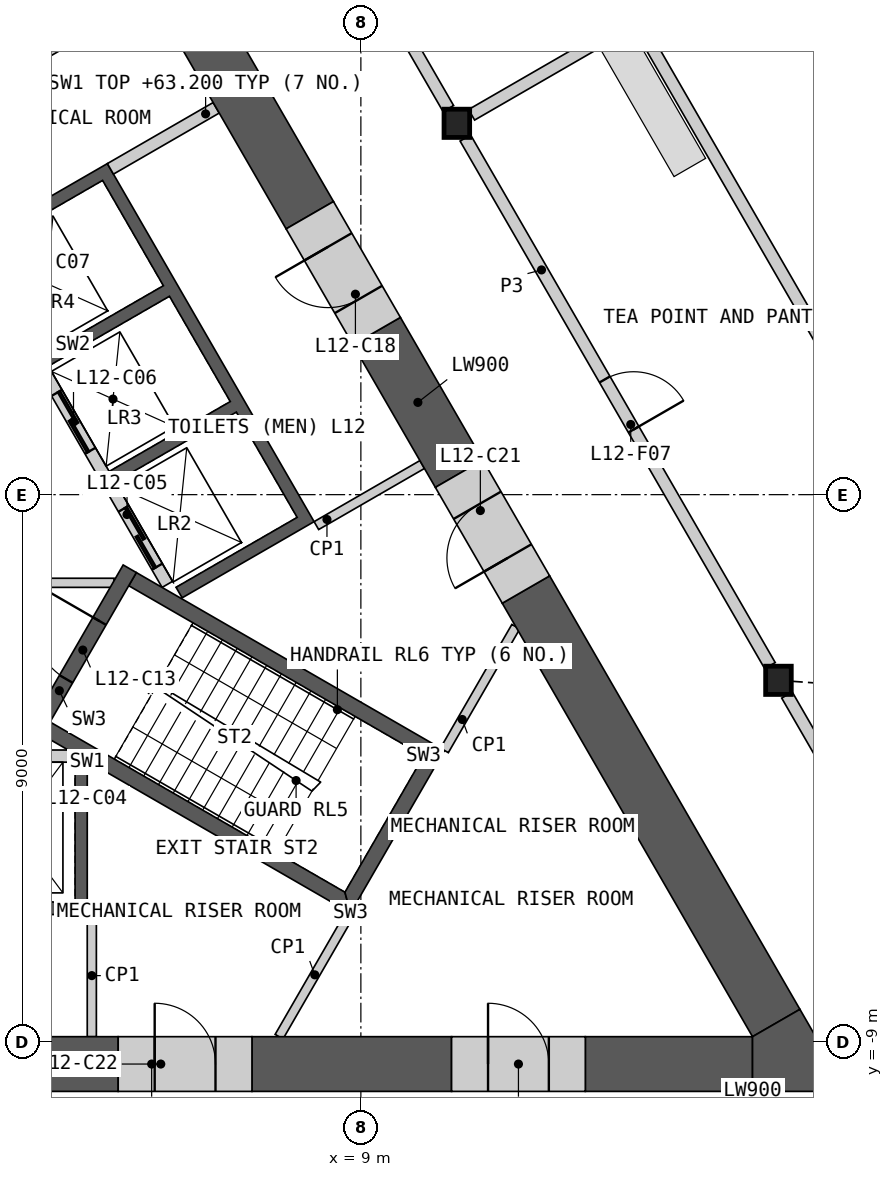
"""IFC4 building model, lengths in metres.
Left out: names, types, materials, properties, quantities, classifications, styles, units other than length and angle.
Written with IfcOpenShell. Run it as: python <this file> out.ifc"""

import sys

from ifc_helpers import new_model, si_unit, direction, frame, frame_2d, origin, origin_2d, place, context, subcontext, project, spatial, polyline, rectangle, i_section, outline, extrude, element, fill, save


model = new_model("IFC4")
c1 = context("Model", 3, precision=1e-05, world=origin(), true_north=direction((0.0, 1.0)))
c2 = subcontext(c1, "Body", "Model", "MODEL_VIEW")
j1 = project(units=[si_unit("LENGTHUNIT", "METRE"), si_unit("PLANEANGLEUNIT", "RADIAN")], contexts=[c1])
p1 = place(None, origin())
s1 = spatial("IfcSite", under=j1, at=p1, CompositionType="ELEMENT")
p2 = place(p1, origin())
s2 = spatial("IfcBuilding", under=s1, at=p2, CompositionType="ELEMENT")
p3 = place(p2, frame((0.0, 0.0, 59.4)))
s3 = spatial("IfcBuildingStorey", under=s2, at=p3, CompositionType="ELEMENT", Elevation=59.4)
for number, where, z_axis, x_axis in (
    (1, (15.868, -3.054, 0.0), (0.0, 0.0, 1.0), (1.0, 0.0, 0.0)),
    (2, (10.578, 6.107, 0.0), (0.0, 0.0, 1.0), (1.0, 0.0, 0.0)),
):
    element("IfcColumn", number, at=place(p3, frame(where, z_axis=z_axis, x_axis=x_axis)), inside=s3, PredefinedType="COLUMN", context=c2, shape_type="SweptSolid", body=[
        extrude(i_section(OverallWidth=0.421, OverallDepth=0.465, WebThickness=0.045, FlangeThickness=0.072, at=origin_2d()), origin(), (0.0, 0.0, 1.0), 4.2),
    ])
p4 = place(p3, origin())
e3 = element("IfcWall", 3, at=p4, inside=s3, PredefinedType="SHEAR", context=c2, shape_type="SweptSolid", body=[
    extrude(outline(polyline([(4.5, -4.4), (4.5, -6.906), (-4.5, -6.906), (-4.5, -4.4), (-4.3, -4.4), (-4.3, -6.7), (-2.3, -6.7), (-2.3, -4.4), (-2.1, -4.4), (-2.1, -6.7), (-0.1, -6.7), (-0.1, -4.4), (0.1, -4.4), (0.1, -6.7), (2.1, -6.7), (2.1, -4.4), (2.3, -4.4), (2.3, -6.7), (4.3, -6.7), (4.3, -4.4), (4.5, -4.4)])), origin(), (0.0, 0.0, 1.0), 3.8),
])
p5 = place(p3, frame((-4.187, -4.3, 0.0), z_axis=(0.0, 0.0, 1.0), x_axis=(1.0, 0.0, 0.0)))
e4 = element("IfcWall", 4, at=p5, inside=s3, PredefinedType="SOLIDWALL", context=c2, shape_type="SweptSolid", body=[
    extrude(rectangle(XDim=8.373, YDim=0.2, at=frame_2d((4.187, 0.0))), origin(), (0.0, 0.0, 1.0), 3.8),
])
p6 = place(p5, frame((0.287, 0.0, 0.0)))
e5 = element("IfcOpeningElement", 5, at=p6, cuts=e4, PredefinedType="OPENING", context=c2, shape_type="SweptSolid", body=[
    extrude(rectangle(XDim=1.2, YDim=2.1, at=frame_2d((0.6, 1.05))), frame((0.0, 0.11, 0.0), z_axis=(0.0, -1.0, 0.0), x_axis=(1.0, 0.0, 0.0)), (0.0, 0.0, 1.0), 0.22),
])
p7 = place(p5, frame((2.387, 0.0, 0.0)))
e6 = element("IfcOpeningElement", 6, at=p7, cuts=e4, PredefinedType="OPENING", context=c2, shape_type="SweptSolid", body=[
    extrude(rectangle(XDim=1.4, YDim=2.1, at=frame_2d((0.7, 1.05))), frame((0.0, 0.11, 0.0), z_axis=(0.0, -1.0, 0.0), x_axis=(1.0, 0.0, 0.0)), (0.0, 0.0, 1.0), 0.22),
])
p8 = place(p5, frame((4.737, 0.0, 0.0)))
e7 = element("IfcOpeningElement", 7, at=p8, cuts=e4, PredefinedType="OPENING", context=c2, shape_type="SweptSolid", body=[
    extrude(rectangle(XDim=1.1, YDim=2.1, at=frame_2d((0.55, 1.05))), frame((0.0, 0.11, 0.0), z_axis=(0.0, -1.0, 0.0), x_axis=(1.0, 0.0, 0.0)), (0.0, 0.0, 1.0), 0.22),
])
p9 = place(p5, frame((6.887, 0.0, 0.0)))
e8 = element("IfcOpeningElement", 8, at=p9, cuts=e4, PredefinedType="OPENING", context=c2, shape_type="SweptSolid", body=[
    extrude(rectangle(XDim=1.2, YDim=2.1, at=frame_2d((0.6, 1.05))), frame((0.0, 0.11, 0.0), z_axis=(0.0, -1.0, 0.0), x_axis=(1.0, 0.0, 0.0)), (0.0, 0.0, 1.0), 0.22),
])
p10 = place(p3, origin())
e9 = element("IfcWall", 9, at=p10, inside=s3, PredefinedType="SHEAR", context=c2, shape_type="SweptSolid", body=[
    extrude(outline(polyline([(2.66, 4.192), (4.831, 5.445), (8.231, -0.444), (6.061, -1.697), (5.96, -1.524), (7.952, -0.374), (6.952, 1.358), (4.96, 0.208), (4.861, 0.381), (6.852, 1.531), (5.852, 3.263), (3.861, 2.113), (3.76, 2.287), (5.752, 3.437), (4.752, 5.169), (2.76, 4.019), (2.66, 4.192)])), origin(), (0.0, 0.0, 1.0), 3.8),
])
p11 = place(p3, frame((5.817, -1.476, 0.0), z_axis=(0.0, 0.0, 1.0), x_axis=(-0.500002616675, 0.866023893041, 0.0)))
e10 = element("IfcWall", 10, at=p11, inside=s3, PredefinedType="SOLIDWALL", context=c2, shape_type="SweptSolid", body=[
    extrude(rectangle(XDim=8.373, YDim=0.2, at=frame_2d((4.187, 0.0))), origin(), (0.0, 0.0, 1.0), 3.8),
])
p12 = place(p11, frame((0.337, 0.0, 0.0)))
e11 = element("IfcOpeningElement", 11, at=p12, cuts=e10, PredefinedType="OPENING", context=c2, shape_type="SweptSolid", body=[
    extrude(rectangle(XDim=1.1, YDim=2.1, at=frame_2d((0.55, 1.05))), frame((0.0, 0.11, 0.0), z_axis=(0.0, -1.0, 0.0), x_axis=(1.0, 0.0, 0.0)), (0.0, 0.0, 1.0), 0.22),
])
p13 = place(p11, frame((2.537, 0.0, 0.0)))
e12 = element("IfcOpeningElement", 12, at=p13, cuts=e10, PredefinedType="OPENING", context=c2, shape_type="SweptSolid", body=[
    extrude(rectangle(XDim=1.1, YDim=2.1, at=frame_2d((0.55, 1.05))), frame((0.0, 0.11, 0.0), z_axis=(0.0, -1.0, 0.0), x_axis=(1.0, 0.0, 0.0)), (0.0, 0.0, 1.0), 0.22),
])
p14 = place(p11, frame((4.737, 0.0, 0.0)))
e13 = element("IfcOpeningElement", 13, at=p14, cuts=e10, PredefinedType="OPENING", context=c2, shape_type="SweptSolid", body=[
    extrude(rectangle(XDim=1.1, YDim=2.1, at=frame_2d((0.55, 1.05))), frame((0.0, 0.11, 0.0), z_axis=(0.0, -1.0, 0.0), x_axis=(1.0, 0.0, 0.0)), (0.0, 0.0, 1.0), 0.22),
])
p15 = place(p11, frame((7.037, 0.0, 0.0)))
e14 = element("IfcOpeningElement", 14, at=p15, cuts=e10, PredefinedType="OPENING", context=c2, shape_type="SweptSolid", body=[
    extrude(rectangle(XDim=0.9, YDim=2.1, at=frame_2d((0.45, 1.05))), frame((0.0, 0.11, 0.0), z_axis=(0.0, -1.0, 0.0), x_axis=(1.0, 0.0, 0.0)), (0.0, 0.0, 1.0), 0.22),
])
p16 = place(p3, frame((4.881, 5.358, 0.0), z_axis=(0.0, 0.0, 1.0), x_axis=(0.866035824272, 0.499981950752, 0.0)))
e15 = element("IfcWall", 15, at=p16, inside=s3, PredefinedType="SHEAR", context=c2, shape_type="SweptSolid", body=[
    extrude(rectangle(XDim=2.009, YDim=0.2, at=frame_2d((1.004, 0.0))), origin(), (0.0, 0.0, 1.0), 3.8),
])
p17 = place(p3, frame((3.781, 7.263, 0.0), z_axis=(0.0, 0.0, 1.0), x_axis=(0.865983199114, 0.50007309351, 0.0)))
e16 = element("IfcWall", 16, at=p17, inside=s3, PredefinedType="SHEAR", context=c2, shape_type="SweptSolid", body=[
    extrude(rectangle(XDim=2.009, YDim=0.2, at=frame_2d((1.004, 0.0))), origin(), (0.0, 0.0, 1.0), 3.8),
])
p18 = place(p3, frame((-4.941, -1.45, 0.0), z_axis=(0.0, 0.0, 1.0), x_axis=(1.0, 0.0, 0.0)))
e17 = element("IfcWall", 17, at=p18, inside=s3, PredefinedType="PARTITIONING", context=c2, shape_type="SweptSolid", body=[
    extrude(rectangle(XDim=9.882, YDim=0.15, at=frame_2d((4.941, 0.0))), origin(), (0.0, 0.0, 1.0), 3.8),
])
p19 = place(p18, frame((4.391, 0.0, 0.0)))
e18 = element("IfcOpeningElement", 18, at=p19, cuts=e17, PredefinedType="OPENING", context=c2, shape_type="SweptSolid", body=[
    extrude(rectangle(XDim=1.1, YDim=2.1, at=frame_2d((0.55, 1.05))), frame((0.0, 0.085, 0.0), z_axis=(0.0, -1.0, 0.0), x_axis=(1.0, 0.0, 0.0)), (0.0, 0.0, 1.0), 0.17),
])
p20 = place(p3, origin())
e19 = element("IfcWall", 19, at=p20, inside=s3, PredefinedType="SHEAR", context=c2, shape_type="SweptSolid", body=[
    extrude(outline(polyline([(3.763, -3.956), (8.83, -6.881), (8.738, -6.539), (3.888, -3.739), (3.763, -3.956)])), origin(), (0.0, 0.0, 1.0), 3.8),
])
p21 = place(p3, origin())
e20 = element("IfcWall", 20, at=p21, inside=s3, PredefinedType="SHEAR", context=c2, shape_type="SweptSolid", body=[
    extrude(outline(polyline([(8.83, -6.881), (10.374, -4.206), (10.032, -4.298), (8.738, -6.539), (8.83, -6.881)])), origin(), (0.0, 0.0, 1.0), 3.8),
])
p22 = place(p3, origin())
e21 = element("IfcWall", 21, at=p22, inside=s3, PredefinedType="SHEAR", context=c2, shape_type="SweptSolid", body=[
    extrude(outline(polyline([(10.032, -4.298), (10.374, -4.206), (5.307, -1.281), (5.182, -1.498), (10.032, -4.298)])), origin(), (0.0, 0.0, 1.0), 3.8),
])
p23 = place(p3, frame((3.655, -3.893, 0.0), z_axis=(0.0, 0.0, 1.0), x_axis=(0.499982516597, 0.866035497597, 0.0)))
e22 = element("IfcWall", 22, at=p23, inside=s3, PredefinedType="SHEAR", context=c2, shape_type="SweptSolid", body=[
    extrude(rectangle(XDim=3.088, YDim=0.25, at=frame_2d((1.544, 0.0))), origin(), (0.0, 0.0, 1.0), 3.8),
])
p24 = place(p23, frame((0.994, 0.0, 0.0)))
e23 = element("IfcOpeningElement", 23, at=p24, cuts=e22, PredefinedType="OPENING", context=c2, shape_type="SweptSolid", body=[
    extrude(rectangle(XDim=1.1, YDim=2.1, at=frame_2d((0.55, 1.05))), frame((0.0, 0.135, 0.0), z_axis=(0.0, -1.0, 0.0), x_axis=(1.0, 0.0, 0.0)), (0.0, 0.0, 1.0), 0.27),
])
p25 = place(p3, frame((4.575, -6.906, 0.0), z_axis=(0.0, 0.0, 1.0), x_axis=(0.0, -1.0, 0.0)))
e24 = element("IfcWall", 24, at=p25, inside=s3, PredefinedType="PARTITIONING", context=c2, shape_type="SweptSolid", body=[
    extrude(rectangle(XDim=2.009, YDim=0.15, at=frame_2d((1.004, 0.0))), origin(), (0.0, 0.0, 1.0), 3.8),
])
p26 = place(p3, frame((8.268, -0.509, 0.0), z_axis=(0.0, 0.0, 1.0), x_axis=(0.866035824272, 0.499981950752, 0.0)))
e25 = element("IfcWall", 25, at=p26, inside=s3, PredefinedType="PARTITIONING", context=c2, shape_type="SweptSolid", body=[
    extrude(rectangle(XDim=2.009, YDim=0.15, at=frame_2d((1.004, 0.0))), origin(), (0.0, 0.0, 1.0), 3.8),
])
p27 = place(p3, frame((8.83, -6.881, 0.0), z_axis=(0.0, 0.0, 1.0), x_axis=(-0.500073279432, -0.865983091751, 0.0)))
e26 = element("IfcWall", 26, at=p27, inside=s3, PredefinedType="PARTITIONING", context=c2, shape_type="SweptSolid", body=[
    extrude(rectangle(XDim=2.349, YDim=0.15, at=frame_2d((1.175, 0.0))), origin(), (0.0, 0.0, 1.0), 3.8),
])
p28 = place(p3, frame((10.374, -4.206, 0.0), z_axis=(0.0, 0.0, 1.0), x_axis=(0.499995339376, 0.86602809458, 0.0)))
e27 = element("IfcWall", 27, at=p28, inside=s3, PredefinedType="PARTITIONING", context=c2, shape_type="SweptSolid", body=[
    extrude(rectangle(XDim=2.349, YDim=0.15, at=frame_2d((1.175, 0.0))), origin(), (0.0, 0.0, 1.0), 3.8),
])
p29 = place(p3, frame((1.1, -9.365, 0.0), z_axis=(0.0, 0.0, 1.0), x_axis=(1.0, 0.0, 0.0)))
e28 = element("IfcWall", 28, at=p29, inside=s3, PredefinedType="SHEAR", context=c2, shape_type="SweptSolid", body=[
    extrude(rectangle(XDim=3.909, YDim=0.9, at=frame_2d((1.955, 0.0))), origin(), (0.0, 0.0, 1.0), 3.8),
])
p30 = place(p3, frame((7.209, -9.365, 0.0), z_axis=(0.0, 0.0, 1.0), x_axis=(1.0, 0.0, 0.0)))
e29 = element("IfcWall", 29, at=p30, inside=s3, PredefinedType="SHEAR", context=c2, shape_type="SweptSolid", body=[
    extrude(rectangle(XDim=3.282, YDim=0.9, at=frame_2d((1.641, 0.0))), origin(), (0.0, 0.0, 1.0), 3.8),
])
p31 = place(p3, frame((12.691, -9.365, 0.0), z_axis=(0.0, 0.0, 1.0), x_axis=(1.0, 0.0, 0.0)))
e30 = element("IfcWall", 30, at=p31, inside=s3, PredefinedType="SHEAR", context=c2, shape_type="SweptSolid", body=[
    extrude(rectangle(XDim=2.75, YDim=0.9, at=frame_2d((1.375, 0.0))), origin(), (0.0, 0.0, 1.0), 3.8),
])
p32 = place(p3, frame((8.16, 4.596, 0.0), z_axis=(0.0, 0.0, 1.0), x_axis=(-0.500009830349, 0.866019728156, 0.0)))
e31 = element("IfcWall", 31, at=p32, inside=s3, PredefinedType="SHEAR", context=c2, shape_type="SweptSolid", body=[
    extrude(rectangle(XDim=15.541, YDim=0.9, at=frame_2d((7.771, 0.0))), origin(), (0.0, 0.0, 1.0), 3.8),
])
p33 = place(p3, frame((15.831, -8.69, 0.0), z_axis=(0.0, 0.0, 1.0), x_axis=(-0.499995435471, 0.8660280391, 0.0)))
e32 = element("IfcWall", 32, at=p33, inside=s3, PredefinedType="SHEAR", context=c2, shape_type="SweptSolid", body=[
    extrude(rectangle(XDim=8.232, YDim=0.9, at=frame_2d((4.116, 0.0))), origin(), (0.0, 0.0, 1.0), 3.8),
])
p34 = place(p3, frame((10.615, 0.344, 0.0), z_axis=(0.0, 0.0, 1.0), x_axis=(-0.500044870432, 0.865999496279, 0.0)))
e33 = element("IfcWall", 33, at=p34, inside=s3, PredefinedType="SHEAR", context=c2, shape_type="SweptSolid", body=[
    extrude(rectangle(XDim=2.709, YDim=0.9, at=frame_2d((1.354, 0.0))), origin(), (0.0, 0.0, 1.0), 3.8),
])
p35 = place(p3, origin())
e34 = element("IfcWall", 34, at=p35, inside=s3, PredefinedType="SHEAR", context=c2, shape_type="SweptSolid", body=[
    extrude(outline(polyline([(15.441, -9.815), (15.441, -8.915), (16.221, -8.465), (17.0, -9.815), (15.441, -9.815)])), origin(), (0.0, 0.0, 1.0), 3.8),
])
p36 = place(p3, frame((10.491, -9.365, 0.0), z_axis=(0.0, 0.0, 1.0), x_axis=(1.0, 0.0, 0.0)))
e35 = element("IfcWall", 35, at=p36, inside=s3, PredefinedType="SHEAR", context=c2, shape_type="SweptSolid", body=[
    extrude(rectangle(XDim=2.2, YDim=0.9, at=frame_2d((1.1, 0.0))), origin(), (0.0, 0.0, 1.0), 3.8),
])
p37 = place(p36, frame((0.6, 0.0, 0.0)))
e36 = element("IfcOpeningElement", 36, at=p37, cuts=e35, PredefinedType="OPENING", context=c2, shape_type="SweptSolid", body=[
    extrude(rectangle(XDim=1.0, YDim=2.1, at=frame_2d((0.5, 1.05))), frame((0.0, 0.46, 0.0), z_axis=(0.0, -1.0, 0.0), x_axis=(1.0, 0.0, 0.0)), (0.0, 0.0, 1.0), 0.92),
])
p38 = place(p3, frame((9.26, 2.691, 0.0), z_axis=(0.0, 0.0, 1.0), x_axis=(-0.499946605688, 0.86605622881, 0.0)))
e37 = element("IfcWall", 37, at=p38, inside=s3, PredefinedType="SHEAR", context=c2, shape_type="SweptSolid", body=[
    extrude(rectangle(XDim=2.2, YDim=0.9, at=frame_2d((1.1, 0.0))), origin(), (0.0, 0.0, 1.0), 3.8),
])
p39 = place(p38, frame((0.6, 0.0, 0.0)))
e38 = element("IfcOpeningElement", 38, at=p39, cuts=e37, PredefinedType="OPENING", context=c2, shape_type="SweptSolid", body=[
    extrude(rectangle(XDim=1.0, YDim=2.1, at=frame_2d((0.5, 1.05))), frame((0.0, 0.46, 0.0), z_axis=(0.0, -1.0, 0.0), x_axis=(1.0, 0.0, 0.0)), (0.0, 0.0, 1.0), 0.92),
])
p40 = place(p3, frame((11.715, -1.561, 0.0), z_axis=(0.0, 0.0, 1.0), x_axis=(-0.499946605688, 0.86605622881, 0.0)))
e39 = element("IfcWall", 39, at=p40, inside=s3, PredefinedType="SHEAR", context=c2, shape_type="SweptSolid", body=[
    extrude(rectangle(XDim=2.2, YDim=0.9, at=frame_2d((1.1, 0.0))), origin(), (0.0, 0.0, 1.0), 3.8),
])
p41 = place(p40, frame((0.6, 0.0, 0.0)))
e40 = element("IfcOpeningElement", 40, at=p41, cuts=e39, PredefinedType="OPENING", context=c2, shape_type="SweptSolid", body=[
    extrude(rectangle(XDim=1.0, YDim=2.1, at=frame_2d((0.5, 1.05))), frame((0.0, 0.46, 0.0), z_axis=(0.0, -1.0, 0.0), x_axis=(1.0, 0.0, 0.0)), (0.0, 0.0, 1.0), 0.92),
])
p42 = place(p3, frame((5.009, -9.365, 0.0), z_axis=(0.0, 0.0, 1.0), x_axis=(1.0, 0.0, 0.0)))
e41 = element("IfcWall", 41, at=p42, inside=s3, PredefinedType="SHEAR", context=c2, shape_type="SweptSolid", body=[
    extrude(rectangle(XDim=2.2, YDim=0.9, at=frame_2d((1.1, 0.0))), origin(), (0.0, 0.0, 1.0), 3.8),
])
p43 = place(p42, frame((0.6, 0.0, 0.0)))
e42 = element("IfcOpeningElement", 42, at=p43, cuts=e41, PredefinedType="OPENING", context=c2, shape_type="SweptSolid", body=[
    extrude(rectangle(XDim=1.0, YDim=2.1, at=frame_2d((0.5, 1.05))), frame((0.0, 0.46, 0.0), z_axis=(0.0, -1.0, 0.0), x_axis=(1.0, 0.0, 0.0)), (0.0, 0.0, 1.0), 0.92),
])
p44 = place(p3, frame((5.429, 15.026, 0.0), z_axis=(0.0, 0.0, 1.0), x_axis=(0.50001002959, -0.86601961312, 0.0)))
e43 = element("IfcWall", 43, at=p44, inside=s3, PredefinedType="PARTITIONING", context=c2, shape_type="SweptSolid", body=[
    extrude(rectangle(XDim=10.019, YDim=0.2, at=frame_2d((5.009, 0.0))), origin(), (0.0, 0.0, 1.0), 3.8),
])
p45 = place(p44, frame((4.059, 0.0, 0.0)))
e44 = element("IfcOpeningElement", 44, at=p45, cuts=e43, PredefinedType="OPENING", context=c2, shape_type="SweptSolid", body=[
    extrude(rectangle(XDim=1.8, YDim=2.1, at=frame_2d((0.9, 1.05))), frame((0.0, 0.11, 0.0), z_axis=(0.0, -1.0, 0.0), x_axis=(1.0, 0.0, 0.0)), (0.0, 0.0, 1.0), 0.22),
])
p46 = place(p3, frame((10.719, 5.865, 0.0), z_axis=(0.0, 0.0, 1.0), x_axis=(0.49999175339, -0.866030164915, 0.0)))
e45 = element("IfcWall", 45, at=p46, inside=s3, PredefinedType="PARTITIONING", context=c2, shape_type="SweptSolid", body=[
    extrude(rectangle(XDim=10.019, YDim=0.2, at=frame_2d((5.009, 0.0))), origin(), (0.0, 0.0, 1.0), 3.8),
])
p47 = place(p46, frame((4.585, 0.0, 0.0)))
e46 = element("IfcOpeningElement", 46, at=p47, cuts=e45, PredefinedType="OPENING", context=c2, shape_type="SweptSolid", body=[
    extrude(rectangle(XDim=0.95, YDim=2.1, at=frame_2d((0.475, 1.05))), frame((0.0, 0.11, 0.0), z_axis=(0.0, -1.0, 0.0), x_axis=(1.0, 0.0, 0.0)), (0.0, 0.0, 1.0), 0.22),
])
p48 = place(p3, frame((16.008, -3.296, 0.0), z_axis=(0.0, 0.0, 1.0), x_axis=(0.499984737558, -0.86603421538, 0.0)))
e47 = element("IfcWall", 47, at=p48, inside=s3, PredefinedType="PARTITIONING", context=c2, shape_type="SweptSolid", body=[
    extrude(rectangle(XDim=6.473, YDim=0.2, at=frame_2d((3.236, 0.0))), origin(), (0.0, 0.0, 1.0), 3.8),
])
p49 = place(p3, frame((13.573, 7.721, 0.0), z_axis=(0.0, 0.0, 1.0), x_axis=(0.499990262232, -0.866031025814, 0.0)))
e48 = element("IfcWall", 48, at=p49, inside=s3, PredefinedType="PARTITIONING", context=c2, shape_type="SweptSolid", body=[
    extrude(rectangle(XDim=17.597, YDim=0.2, at=frame_2d((8.799, 0.0))), origin(), (0.0, 0.0, 1.0), 2.885),
])
p50 = place(p49, frame((9.277, 0.0, 0.0)))
e49 = element("IfcOpeningElement", 49, at=p50, cuts=e48, PredefinedType="OPENING", context=c2, shape_type="SweptSolid", body=[
    extrude(rectangle(XDim=0.95, YDim=2.1, at=frame_2d((0.475, 1.05))), frame((0.0, 0.11, 0.0), z_axis=(0.0, -1.0, 0.0), x_axis=(1.0, 0.0, 0.0)), (0.0, 0.0, 1.0), 0.22),
])
p51 = place(p3, frame((10.821, 6.247, 0.0), z_axis=(0.0, 0.0, 1.0), x_axis=(0.866026729935, 0.499997703033, 0.0)))
e50 = element("IfcWall", 50, at=p51, inside=s3, PredefinedType="PARTITIONING", context=c2, shape_type="SweptSolid", body=[
    extrude(rectangle(XDim=12.848, YDim=0.2, at=frame_2d((6.424, 0.0))), origin(), (0.0, 0.0, 1.0), 2.885),
])
p52 = place(p12, origin())
e51 = element("IfcDoor", 51, at=p52, inside=s3, OperationType="SLIDING_TO_LEFT", PredefinedType="DOOR", context=c2, shape_type="SweptSolid", body=[
    extrude(rectangle(XDim=1.1, YDim=2.1, at=frame_2d((0.55, 1.05))), frame((0.0, 0.025, 0.0), z_axis=(0.0, -1.0, 0.0), x_axis=(1.0, 0.0, 0.0)), (0.0, 0.0, 1.0), 0.05),
])
fill(e11, e51)
p53 = place(p13, origin())
e52 = element("IfcDoor", 52, at=p53, inside=s3, OperationType="SLIDING_TO_LEFT", PredefinedType="DOOR", context=c2, shape_type="SweptSolid", body=[
    extrude(rectangle(XDim=1.1, YDim=2.1, at=frame_2d((0.55, 1.05))), frame((0.0, 0.025, 0.0), z_axis=(0.0, -1.0, 0.0), x_axis=(1.0, 0.0, 0.0)), (0.0, 0.0, 1.0), 0.05),
])
fill(e12, e52)
p54 = place(p24, origin())
e53 = element("IfcDoor", 53, at=p54, inside=s3, OperationType="SINGLE_SWING_RIGHT", PredefinedType="DOOR", context=c2, shape_type="SweptSolid", body=[
    extrude(rectangle(XDim=1.1, YDim=2.1, at=frame_2d((0.55, 1.05))), frame((0.0, 0.025, 0.0), z_axis=(0.0, -1.0, 0.0), x_axis=(1.0, 0.0, 0.0)), (0.0, 0.0, 1.0), 0.05),
])
fill(e23, e53)
p55 = place(p37, origin())
e54 = element("IfcDoor", 54, at=p55, inside=s3, OperationType="SINGLE_SWING_LEFT", PredefinedType="DOOR", context=c2, shape_type="SweptSolid", body=[
    extrude(rectangle(XDim=1.0, YDim=2.1, at=frame_2d((0.5, 1.05))), frame((0.0, 0.205, 0.0), z_axis=(0.0, -1.0, 0.0), x_axis=(1.0, 0.0, 0.0)), (0.0, 0.0, 1.0), 0.05),
])
fill(e36, e54)
p56 = place(p39, origin())
e55 = element("IfcDoor", 55, at=p56, inside=s3, OperationType="SINGLE_SWING_RIGHT", PredefinedType="DOOR", context=c2, shape_type="SweptSolid", body=[
    extrude(rectangle(XDim=1.0, YDim=2.1, at=frame_2d((0.5, 1.05))), frame((0.0, 0.205, 0.0), z_axis=(0.0, -1.0, 0.0), x_axis=(1.0, 0.0, 0.0)), (0.0, 0.0, 1.0), 0.05),
])
fill(e38, e55)
p57 = place(p41, origin())
e56 = element("IfcDoor", 56, at=p57, inside=s3, OperationType="SINGLE_SWING_LEFT", PredefinedType="DOOR", context=c2, shape_type="SweptSolid", body=[
    extrude(rectangle(XDim=1.0, YDim=2.1, at=frame_2d((0.5, 1.05))), frame((0.0, 0.205, 0.0), z_axis=(0.0, -1.0, 0.0), x_axis=(1.0, 0.0, 0.0)), (0.0, 0.0, 1.0), 0.05),
])
fill(e40, e56)
p58 = place(p43, origin())
e57 = element("IfcDoor", 57, at=p58, inside=s3, OperationType="SINGLE_SWING_LEFT", PredefinedType="DOOR", context=c2, shape_type="SweptSolid", body=[
    extrude(rectangle(XDim=1.0, YDim=2.1, at=frame_2d((0.5, 1.05))), frame((0.0, 0.205, 0.0), z_axis=(0.0, -1.0, 0.0), x_axis=(1.0, 0.0, 0.0)), (0.0, 0.0, 1.0), 0.05),
])
fill(e42, e57)
p59 = place(p47, origin())
e58 = element("IfcDoor", 58, at=p59, inside=s3, OperationType="SINGLE_SWING_RIGHT", PredefinedType="DOOR", context=c2, shape_type="SweptSolid", body=[
    extrude(rectangle(XDim=0.95, YDim=2.1, at=frame_2d((0.475, 1.05))), frame((0.0, 0.025, 0.0), z_axis=(0.0, -1.0, 0.0), x_axis=(1.0, 0.0, 0.0)), (0.0, 0.0, 1.0), 0.05),
])
fill(e46, e58)
save(model, sys.argv[1])
